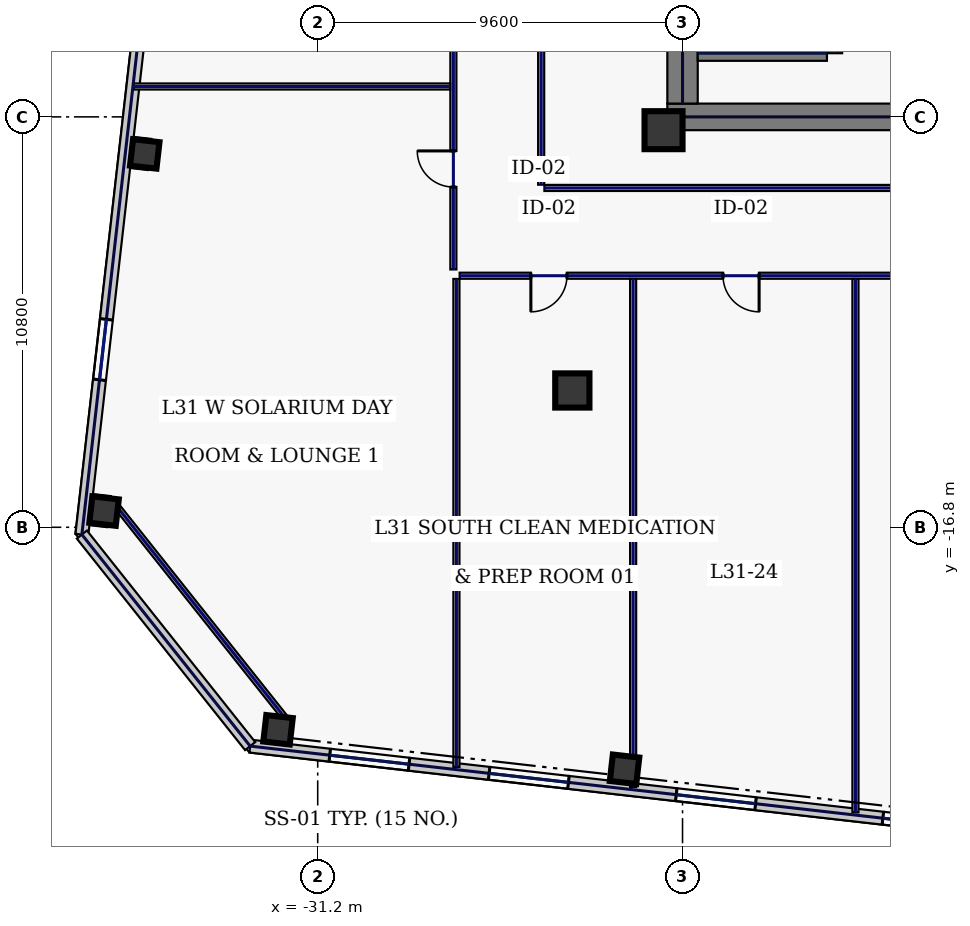
"""IFC4 building model, lengths in metres.
Left out: names, types, materials, properties, quantities, classifications, styles, units other than length and angle.
Written with IfcOpenShell. Run it as: python <this file> out.ifc"""

import sys

from ifc_helpers import new_model, si_unit, direction, frame, frame_2d, origin, origin_2d, place, context, subcontext, project, spatial, rectangle, hollow_rectangle, extrude, element, fill, save


model = new_model("IFC4")
c1 = context("Model", 3, precision=1e-05, world=origin(), true_north=direction((0.0, 1.0)))
c2 = subcontext(c1, "Body", "Model", "MODEL_VIEW")
j1 = project(units=[si_unit("LENGTHUNIT", "METRE"), si_unit("PLANEANGLEUNIT", "RADIAN")], contexts=[c1])
p1 = place(None, origin())
s1 = spatial("IfcSite", under=j1, at=p1, CompositionType="ELEMENT")
p2 = place(p1, origin())
s2 = spatial("IfcBuilding", under=s1, at=p2, CompositionType="ELEMENT")
p3 = place(p2, frame((0.0, 0.0, 137.4)))
s3 = spatial("IfcBuildingStorey", under=s2, at=p3, CompositionType="ELEMENT", Elevation=137.4)
p4 = place(p3, frame((-22.0, -6.0, 0.0), z_axis=(0.0, 0.0, 1.0), x_axis=(1.0, 0.0, 0.0)))
e1 = element("IfcWall", 1, at=p4, inside=s3, PredefinedType="SHEAR", context=c2, shape_type="SweptSolid", body=[
    extrude(rectangle(XDim=11.55, YDim=0.7, at=frame_2d((5.775, 0.0))), origin(), (0.0, 0.0, 1.0), 3.74),
])
p5 = place(p3, frame((-21.6, -5.65, 0.0), z_axis=(0.0, 0.0, 1.0), x_axis=(0.0, 1.0, 0.0)))
e2 = element("IfcWall", 2, at=p5, inside=s3, PredefinedType="SHEAR", context=c2, shape_type="SweptSolid", body=[
    extrude(rectangle(XDim=11.3, YDim=0.8, at=frame_2d((5.65, 0.0))), origin(), (0.0, 0.0, 1.0), 3.74),
])
p6 = place(p3, frame((-17.6, -4.325, 0.0), z_axis=(0.0, 0.0, 1.0), x_axis=(0.0, 1.0, 0.0)))
e3 = element("IfcWall", 3, at=p6, inside=s3, PredefinedType="SHEAR", context=c2, shape_type="SweptSolid", body=[
    extrude(rectangle(XDim=8.65, YDim=0.4, at=frame_2d((4.325, 0.0))), origin(), (0.0, 0.0, 1.0), 3.74),
])
p7 = place(p6, frame((0.25, 0.0, 0.0)))
e4 = element("IfcOpeningElement", 4, at=p7, cuts=e3, PredefinedType="OPENING", context=c2, shape_type="SweptSolid", body=[
    extrude(rectangle(XDim=1.1, YDim=2.2, at=frame_2d((0.55, 1.1))), frame((0.0, 0.21, 0.0), z_axis=(0.0, -1.0, 0.0), x_axis=(1.0, 0.0, 0.0)), (0.0, 0.0, 1.0), 0.42),
])
p8 = place(p3, frame((-21.2, -4.325, 0.0), z_axis=(0.0, 0.0, 1.0), x_axis=(1.0, 0.0, 0.0)))
e5 = element("IfcWall", 5, at=p8, inside=s3, PredefinedType="SHEAR", context=c2, shape_type="SweptSolid", body=[
    extrude(rectangle(XDim=3.4, YDim=0.4, at=frame_2d((1.7, 0.0))), origin(), (0.0, 0.0, 1.0), 3.74),
])
p9 = place(p3, frame((-22.1, -6.35, 0.0), z_axis=(0.0, 0.0, 1.0), x_axis=(1.0, 0.0, 0.0)))
e6 = element("IfcColumn", 6, at=p9, inside=s3, PredefinedType="COLUMN", context=c2, shape_type="SweptSolid", body=[
    extrude(hollow_rectangle(XDim=1.0, YDim=1.0, WallThickness=0.045, at=origin_2d()), origin(), (0.0, 0.0, 1.0), 3.74),
])
p10 = place(p3, frame((-24.5, -13.2, 0.0), z_axis=(0.0, 0.0, 1.0), x_axis=(1.0, 0.0, 0.0)))
e7 = element("IfcColumn", 7, at=p10, inside=s3, PredefinedType="COLUMN", context=c2, shape_type="SweptSolid", body=[
    extrude(hollow_rectangle(XDim=0.9, YDim=0.9, WallThickness=0.04, at=origin_2d()), origin(), (0.0, 0.0, 1.0), 3.74),
])
for number, where, z_axis, x_axis in (
    (8, (-32.244, -22.129, 0.0), (0.0, 0.0, 1.0), (0.994, -0.113, 0.0)),
    (9, (-23.126, -23.168, 0.0), (0.0, 0.0, 1.0), (0.994, -0.113, 0.0)),
    (10, (-35.751, -6.974, 0.0), (0.0, 0.0, 1.0), (0.994, -0.113, 0.0)),
    (11, (-36.822, -16.374, 0.0), (0.0, 0.0, 1.0), (0.994, -0.113, 0.0)),
):
    element("IfcColumn", number, at=place(p3, frame(where, z_axis=z_axis, x_axis=x_axis)), inside=s3, PredefinedType="COLUMN", context=c2, shape_type="SweptSolid", body=[
        extrude(hollow_rectangle(XDim=0.7, YDim=0.7, WallThickness=0.032, at=origin_2d()), origin(), (0.0, 0.0, 1.0), 3.74),
    ])
p11 = place(p3, frame((-32.977, -22.559, 0.0), z_axis=(0.0, 0.0, 1.0), x_axis=(0.993571214605, -0.113208840243, 0.0)))
e12 = element("IfcWall", 12, at=p11, inside=s3, PredefinedType="STANDARD", context=c2, shape_type="SweptSolid", body=[
    extrude(rectangle(XDim=21.223, YDim=0.34, at=frame_2d((10.611, 0.0))), origin(), (0.0, 0.0, 1.0), 3.74),
])
p12 = place(p11, frame((2.108, 0.0, 0.67)))
e13 = element("IfcOpeningElement", 13, at=p12, cuts=e12, PredefinedType="OPENING", context=c2, shape_type="SweptSolid", body=[
    extrude(rectangle(XDim=2.1, YDim=2.2, at=frame_2d((1.05, 1.1))), frame((0.0, 0.18, 0.0), z_axis=(0.0, -1.0, 0.0), x_axis=(1.0, 0.0, 0.0)), (0.0, 0.0, 1.0), 0.36),
])
p13 = place(p11, frame((6.329, 0.0, 0.67)))
e14 = element("IfcOpeningElement", 14, at=p13, cuts=e12, PredefinedType="OPENING", context=c2, shape_type="SweptSolid", body=[
    extrude(rectangle(XDim=2.1, YDim=2.2, at=frame_2d((1.05, 1.1))), frame((0.0, 0.18, 0.0), z_axis=(0.0, -1.0, 0.0), x_axis=(1.0, 0.0, 0.0)), (0.0, 0.0, 1.0), 0.36),
])
p14 = place(p11, frame((11.285, 0.0, 0.67)))
e15 = element("IfcOpeningElement", 15, at=p14, cuts=e12, PredefinedType="OPENING", context=c2, shape_type="SweptSolid", body=[
    extrude(rectangle(XDim=2.1, YDim=2.2, at=frame_2d((1.05, 1.1))), frame((0.0, 0.18, 0.0), z_axis=(0.0, -1.0, 0.0), x_axis=(1.0, 0.0, 0.0)), (0.0, 0.0, 1.0), 0.36),
])
p15 = place(p11, frame((16.756, 0.0, 0.67)))
e16 = element("IfcOpeningElement", 16, at=p15, cuts=e12, PredefinedType="OPENING", context=c2, shape_type="SweptSolid", body=[
    extrude(rectangle(XDim=0.85, YDim=1.85, at=frame_2d((0.425, 0.925))), frame((0.0, 0.18, 0.0), z_axis=(0.0, -1.0, 0.0), x_axis=(1.0, 0.0, 0.0)), (0.0, 0.0, 1.0), 0.36),
])
p16 = place(p3, frame((-32.968, 21.957, 0.0), z_axis=(0.0, 0.0, 1.0), x_axis=(-0.113201605824, -0.993572038877, 0.0)))
e17 = element("IfcWall", 17, at=p16, inside=s3, PredefinedType="STANDARD", context=c2, shape_type="SweptSolid", body=[
    extrude(rectangle(XDim=39.2, YDim=0.34, at=frame_2d((19.6, 0.0))), origin(), (0.0, 0.0, 1.0), 3.74),
])
p17 = place(p16, frame((4.1, 0.0, 0.58)))
e18 = element("IfcOpeningElement", 18, at=p17, cuts=e17, PredefinedType="OPENING", context=c2, shape_type="SweptSolid", body=[
    extrude(rectangle(XDim=1.6, YDim=2.3, at=frame_2d((0.8, 1.15))), frame((0.0, 0.18, 0.0), z_axis=(0.0, -1.0, 0.0), x_axis=(1.0, 0.0, 0.0)), (0.0, 0.0, 1.0), 0.36),
])
p18 = place(p16, frame((13.9, 0.0, 0.58)))
e19 = element("IfcOpeningElement", 19, at=p18, cuts=e17, PredefinedType="OPENING", context=c2, shape_type="SweptSolid", body=[
    extrude(rectangle(XDim=1.6, YDim=2.3, at=frame_2d((0.8, 1.15))), frame((0.0, 0.18, 0.0), z_axis=(0.0, -1.0, 0.0), x_axis=(1.0, 0.0, 0.0)), (0.0, 0.0, 1.0), 0.36),
])
p19 = place(p16, frame((23.7, 0.0, 0.58)))
e20 = element("IfcOpeningElement", 20, at=p19, cuts=e17, PredefinedType="OPENING", context=c2, shape_type="SweptSolid", body=[
    extrude(rectangle(XDim=1.6, YDim=2.3, at=frame_2d((0.8, 1.15))), frame((0.0, 0.18, 0.0), z_axis=(0.0, -1.0, 0.0), x_axis=(1.0, 0.0, 0.0)), (0.0, 0.0, 1.0), 0.36),
])
p20 = place(p16, frame((33.5, 0.0, 0.58)))
e21 = element("IfcOpeningElement", 21, at=p20, cuts=e17, PredefinedType="OPENING", context=c2, shape_type="SweptSolid", body=[
    extrude(rectangle(XDim=1.6, YDim=2.3, at=frame_2d((0.8, 1.15))), frame((0.0, 0.18, 0.0), z_axis=(0.0, -1.0, 0.0), x_axis=(1.0, 0.0, 0.0)), (0.0, 0.0, 1.0), 0.36),
])
p21 = place(p3, frame((-37.406, -16.991, 0.0), z_axis=(0.0, 0.0, 1.0), x_axis=(0.622507800567, -0.78261359446, 0.0)))
e22 = element("IfcWall", 22, at=p21, inside=s3, PredefinedType="STANDARD", context=c2, shape_type="SweptSolid", body=[
    extrude(rectangle(XDim=7.114, YDim=0.34, at=frame_2d((3.557, 0.0))), origin(), (0.0, 0.0, 1.0), 3.74),
])
p22 = place(p3, frame((-36.556, -16.162, 0.0), z_axis=(0.0, 0.0, 1.0), x_axis=(0.622522641622, -0.782601789334, 0.0)))
e23 = element("IfcWall", 23, at=p22, inside=s3, PredefinedType="PARTITIONING", context=c2, shape_type="SweptSolid", body=[
    extrude(rectangle(XDim=7.354, YDim=0.16, at=frame_2d((3.677, 0.0))), origin(), (0.0, 0.0, 1.0), 3.74),
])
p23 = place(p3, frame((-27.63, -10.015, 0.0), z_axis=(0.0, 0.0, 1.0), x_axis=(0.0, 1.0, 0.0)))
e24 = element("IfcWall", 24, at=p23, inside=s3, PredefinedType="PARTITIONING", context=c2, shape_type="SweptSolid", body=[
    extrude(rectangle(XDim=20.13, YDim=0.16, at=frame_2d((10.065, 0.0))), origin(), (0.0, 0.0, 1.0), 3.74),
])
p24 = place(p23, frame((2.169, 0.0, 0.0)))
e25 = element("IfcOpeningElement", 25, at=p24, cuts=e24, PredefinedType="OPENING", context=c2, shape_type="SweptSolid", body=[
    extrude(rectangle(XDim=0.95, YDim=2.2, at=frame_2d((0.475, 1.1))), frame((0.0, 0.09, 0.0), z_axis=(0.0, -1.0, 0.0), x_axis=(1.0, 0.0, 0.0)), (0.0, 0.0, 1.0), 0.18),
])
p25 = place(p23, frame((7.025, 0.0, 0.0)))
e26 = element("IfcOpeningElement", 26, at=p25, cuts=e24, PredefinedType="OPENING", context=c2, shape_type="SweptSolid", body=[
    extrude(rectangle(XDim=0.95, YDim=2.2, at=frame_2d((0.475, 1.1))), frame((0.0, 0.09, 0.0), z_axis=(0.0, -1.0, 0.0), x_axis=(1.0, 0.0, 0.0)), (0.0, 0.0, 1.0), 0.18),
])
p26 = place(p23, frame((12.225, 0.0, 0.0)))
e27 = element("IfcOpeningElement", 27, at=p26, cuts=e24, PredefinedType="OPENING", context=c2, shape_type="SweptSolid", body=[
    extrude(rectangle(XDim=0.95, YDim=2.2, at=frame_2d((0.475, 1.1))), frame((0.0, 0.09, 0.0), z_axis=(0.0, -1.0, 0.0), x_axis=(1.0, 0.0, 0.0)), (0.0, 0.0, 1.0), 0.18),
])
p27 = place(p23, frame((17.131, 0.0, 0.0)))
e28 = element("IfcOpeningElement", 28, at=p27, cuts=e24, PredefinedType="OPENING", context=c2, shape_type="SweptSolid", body=[
    extrude(rectangle(XDim=0.95, YDim=2.2, at=frame_2d((0.475, 1.1))), frame((0.0, 0.09, 0.0), z_axis=(0.0, -1.0, 0.0), x_axis=(1.0, 0.0, 0.0)), (0.0, 0.0, 1.0), 0.18),
])
p28 = place(p3, frame((27.465, -10.18, 0.0), z_axis=(0.0, 0.0, 1.0), x_axis=(-1.0, 0.0, 0.0)))
e29 = element("IfcWall", 29, at=p28, inside=s3, PredefinedType="PARTITIONING", context=c2, shape_type="SweptSolid", body=[
    extrude(rectangle(XDim=54.93, YDim=0.16, at=frame_2d((27.465, 0.0))), origin(), (0.0, 0.0, 1.0), 3.74),
])
p29 = place(p28, frame((52.106, 0.0, 0.0)))
e30 = element("IfcOpeningElement", 30, at=p29, cuts=e29, PredefinedType="OPENING", context=c2, shape_type="SweptSolid", body=[
    extrude(rectangle(XDim=0.95, YDim=2.2, at=frame_2d((0.475, 1.1))), frame((0.0, 0.09, 0.0), z_axis=(0.0, -1.0, 0.0), x_axis=(1.0, 0.0, 0.0)), (0.0, 0.0, 1.0), 0.18),
])
p30 = place(p28, frame((47.05, 0.0, 0.0)))
e31 = element("IfcOpeningElement", 31, at=p30, cuts=e29, PredefinedType="OPENING", context=c2, shape_type="SweptSolid", body=[
    extrude(rectangle(XDim=0.95, YDim=2.2, at=frame_2d((0.475, 1.1))), frame((0.0, 0.09, 0.0), z_axis=(0.0, -1.0, 0.0), x_axis=(1.0, 0.0, 0.0)), (0.0, 0.0, 1.0), 0.18),
])
p31 = place(p28, frame((41.65, 0.0, 0.0)))
e32 = element("IfcOpeningElement", 32, at=p31, cuts=e29, PredefinedType="OPENING", context=c2, shape_type="SweptSolid", body=[
    extrude(rectangle(XDim=0.95, YDim=2.2, at=frame_2d((0.475, 1.1))), frame((0.0, 0.09, 0.0), z_axis=(0.0, -1.0, 0.0), x_axis=(1.0, 0.0, 0.0)), (0.0, 0.0, 1.0), 0.18),
])
p32 = place(p28, frame((35.825, 0.0, 0.0)))
e33 = element("IfcOpeningElement", 33, at=p32, cuts=e29, PredefinedType="OPENING", context=c2, shape_type="SweptSolid", body=[
    extrude(rectangle(XDim=0.95, YDim=2.2, at=frame_2d((0.475, 1.1))), frame((0.0, 0.09, 0.0), z_axis=(0.0, -1.0, 0.0), x_axis=(1.0, 0.0, 0.0)), (0.0, 0.0, 1.0), 0.18),
])
p33 = place(p28, frame((29.575, 0.0, 0.0)))
e34 = element("IfcOpeningElement", 34, at=p33, cuts=e29, PredefinedType="OPENING", context=c2, shape_type="SweptSolid", body=[
    extrude(rectangle(XDim=0.95, YDim=2.2, at=frame_2d((0.475, 1.1))), frame((0.0, 0.09, 0.0), z_axis=(0.0, -1.0, 0.0), x_axis=(1.0, 0.0, 0.0)), (0.0, 0.0, 1.0), 0.18),
])
p34 = place(p28, frame((23.285, 0.0, 0.0)))
e35 = element("IfcOpeningElement", 35, at=p34, cuts=e29, PredefinedType="OPENING", context=c2, shape_type="SweptSolid", body=[
    extrude(rectangle(XDim=0.95, YDim=2.2, at=frame_2d((0.475, 1.1))), frame((0.0, 0.09, 0.0), z_axis=(0.0, -1.0, 0.0), x_axis=(1.0, 0.0, 0.0)), (0.0, 0.0, 1.0), 0.18),
])
p35 = place(p28, frame((16.78, 0.0, 0.0)))
e36 = element("IfcOpeningElement", 36, at=p35, cuts=e29, PredefinedType="OPENING", context=c2, shape_type="SweptSolid", body=[
    extrude(rectangle(XDim=1.3, YDim=2.2, at=frame_2d((0.65, 1.1))), frame((0.0, 0.09, 0.0), z_axis=(0.0, -1.0, 0.0), x_axis=(1.0, 0.0, 0.0)), (0.0, 0.0, 1.0), 0.18),
])
p36 = place(p28, frame((11.23, 0.0, 0.0)))
e37 = element("IfcOpeningElement", 37, at=p36, cuts=e29, PredefinedType="OPENING", context=c2, shape_type="SweptSolid", body=[
    extrude(rectangle(XDim=1.3, YDim=2.2, at=frame_2d((0.65, 1.1))), frame((0.0, 0.09, 0.0), z_axis=(0.0, -1.0, 0.0), x_axis=(1.0, 0.0, 0.0)), (0.0, 0.0, 1.0), 0.18),
])
p37 = place(p28, frame((6.46, 0.0, 0.0)))
e38 = element("IfcOpeningElement", 38, at=p37, cuts=e29, PredefinedType="OPENING", context=c2, shape_type="SweptSolid", body=[
    extrude(rectangle(XDim=1.3, YDim=2.2, at=frame_2d((0.65, 1.1))), frame((0.0, 0.09, 0.0), z_axis=(0.0, -1.0, 0.0), x_axis=(1.0, 0.0, 0.0)), (0.0, 0.0, 1.0), 0.18),
])
p38 = place(p28, frame((2.194, 0.0, 0.0)))
e39 = element("IfcOpeningElement", 39, at=p38, cuts=e29, PredefinedType="OPENING", context=c2, shape_type="SweptSolid", body=[
    extrude(rectangle(XDim=0.95, YDim=2.2, at=frame_2d((0.475, 1.1))), frame((0.0, 0.09, 0.0), z_axis=(0.0, -1.0, 0.0), x_axis=(1.0, 0.0, 0.0)), (0.0, 0.0, 1.0), 0.18),
])
p39 = place(p3, frame((-25.32, 7.885, 0.0), z_axis=(0.0, 0.0, 1.0), x_axis=(0.0, -1.0, 0.0)))
e40 = element("IfcWall", 40, at=p39, inside=s3, PredefinedType="PARTITIONING", context=c2, shape_type="SweptSolid", body=[
    extrude(rectangle(XDim=15.67, YDim=0.16, at=frame_2d((7.835, 0.0))), origin(), (0.0, 0.0, 1.0), 3.74),
])
p40 = place(p3, frame((-25.235, -7.87, 0.0), z_axis=(0.0, 0.0, 1.0), x_axis=(1.0, 0.0, 0.0)))
e41 = element("IfcWall", 41, at=p40, inside=s3, PredefinedType="PARTITIONING", context=c2, shape_type="SweptSolid", body=[
    extrude(rectangle(XDim=14.57, YDim=0.16, at=frame_2d((7.285, 0.0))), origin(), (0.0, 0.0, 1.0), 3.74),
])
p41 = place(p3, frame((-27.55, -23.106, 0.0), z_axis=(0.0, 0.0, 1.0), x_axis=(0.0, 1.0, 0.0)))
e42 = element("IfcWall", 42, at=p41, inside=s3, PredefinedType="PARTITIONING", context=c2, shape_type="SweptSolid", body=[
    extrude(rectangle(XDim=12.842, YDim=0.16, at=frame_2d((6.421, 0.0))), origin(), (0.0, 0.0, 1.0), 3.74),
])
p42 = place(p3, frame((-22.9, -23.636, 0.0), z_axis=(0.0, 0.0, 1.0), x_axis=(0.0, 1.0, 0.0)))
e43 = element("IfcWall", 43, at=p42, inside=s3, PredefinedType="PARTITIONING", context=c2, shape_type="SweptSolid", body=[
    extrude(rectangle(XDim=13.371, YDim=0.16, at=frame_2d((6.686, 0.0))), origin(), (0.0, 0.0, 1.0), 3.74),
])
p43 = place(p3, frame((-17.05, -24.303, 0.0), z_axis=(0.0, 0.0, 1.0), x_axis=(0.0, 1.0, 0.0)))
e44 = element("IfcWall", 44, at=p43, inside=s3, PredefinedType="PARTITIONING", context=c2, shape_type="SweptSolid", body=[
    extrude(rectangle(XDim=14.038, YDim=0.16, at=frame_2d((7.019, 0.0))), origin(), (0.0, 0.0, 1.0), 3.74),
])
p44 = place(p3, frame((-36.042, -5.2, 0.0), z_axis=(0.0, 0.0, 1.0), x_axis=(1.0, 0.0, 0.0)))
e45 = element("IfcWall", 45, at=p44, inside=s3, PredefinedType="PARTITIONING", context=c2, shape_type="SweptSolid", body=[
    extrude(rectangle(XDim=8.327, YDim=0.16, at=frame_2d((4.164, 0.0))), origin(), (0.0, 0.0, 1.0), 3.74),
])
p45 = place(p12, origin())
e46 = element("IfcWindow", 46, at=p45, inside=s3, PartitioningType="SINGLE_PANEL", PredefinedType="WINDOW", context=c2, shape_type="SweptSolid", body=[
    extrude(rectangle(XDim=2.1, YDim=2.2, at=frame_2d((1.05, 1.1))), frame((0.0, 0.03, 0.0), z_axis=(0.0, -1.0, 0.0), x_axis=(1.0, 0.0, 0.0)), (0.0, 0.0, 1.0), 0.06),
])
fill(e13, e46)
p46 = place(p13, origin())
e47 = element("IfcWindow", 47, at=p46, inside=s3, PartitioningType="SINGLE_PANEL", PredefinedType="WINDOW", context=c2, shape_type="SweptSolid", body=[
    extrude(rectangle(XDim=2.1, YDim=2.2, at=frame_2d((1.05, 1.1))), frame((0.0, 0.03, 0.0), z_axis=(0.0, -1.0, 0.0), x_axis=(1.0, 0.0, 0.0)), (0.0, 0.0, 1.0), 0.06),
])
fill(e14, e47)
p47 = place(p14, origin())
e48 = element("IfcWindow", 48, at=p47, inside=s3, PartitioningType="SINGLE_PANEL", PredefinedType="WINDOW", context=c2, shape_type="SweptSolid", body=[
    extrude(rectangle(XDim=2.1, YDim=2.2, at=frame_2d((1.05, 1.1))), frame((0.0, 0.03, 0.0), z_axis=(0.0, -1.0, 0.0), x_axis=(1.0, 0.0, 0.0)), (0.0, 0.0, 1.0), 0.06),
])
fill(e15, e48)
p48 = place(p15, origin())
e49 = element("IfcWindow", 49, at=p48, inside=s3, PartitioningType="SINGLE_PANEL", PredefinedType="WINDOW", context=c2, shape_type="SweptSolid", body=[
    extrude(rectangle(XDim=0.85, YDim=1.85, at=frame_2d((0.425, 0.925))), frame((0.0, 0.03, 0.0), z_axis=(0.0, -1.0, 0.0), x_axis=(1.0, 0.0, 0.0)), (0.0, 0.0, 1.0), 0.06),
])
fill(e16, e49)
p49 = place(p20, origin())
e50 = element("IfcWindow", 50, at=p49, inside=s3, PartitioningType="SINGLE_PANEL", PredefinedType="WINDOW", context=c2, shape_type="SweptSolid", body=[
    extrude(rectangle(XDim=1.6, YDim=2.3, at=frame_2d((0.8, 1.15))), frame((0.0, 0.03, 0.0), z_axis=(0.0, -1.0, 0.0), x_axis=(1.0, 0.0, 0.0)), (0.0, 0.0, 1.0), 0.06),
])
fill(e21, e50)
p50 = place(p29, origin())
e51 = element("IfcDoor", 51, at=p50, inside=s3, OperationType="SINGLE_SWING_RIGHT", PredefinedType="DOOR", context=c2, shape_type="SweptSolid", body=[
    extrude(rectangle(XDim=0.95, YDim=2.2, at=frame_2d((0.475, 1.1))), frame((0.0, 0.025, 0.0), z_axis=(0.0, -1.0, 0.0), x_axis=(1.0, 0.0, 0.0)), (0.0, 0.0, 1.0), 0.05),
])
fill(e30, e51)
p51 = place(p30, origin())
e52 = element("IfcDoor", 52, at=p51, inside=s3, OperationType="SINGLE_SWING_LEFT", PredefinedType="DOOR", context=c2, shape_type="SweptSolid", body=[
    extrude(rectangle(XDim=0.95, YDim=2.2, at=frame_2d((0.475, 1.1))), frame((0.0, 0.025, 0.0), z_axis=(0.0, -1.0, 0.0), x_axis=(1.0, 0.0, 0.0)), (0.0, 0.0, 1.0), 0.05),
])
fill(e31, e52)
p52 = place(p24, origin())
e53 = element("IfcDoor", 53, at=p52, inside=s3, OperationType="SINGLE_SWING_RIGHT", PredefinedType="DOOR", context=c2, shape_type="SweptSolid", body=[
    extrude(rectangle(XDim=0.95, YDim=2.2, at=frame_2d((0.475, 1.1))), frame((0.0, 0.025, 0.0), z_axis=(0.0, -1.0, 0.0), x_axis=(1.0, 0.0, 0.0)), (0.0, 0.0, 1.0), 0.05),
])
fill(e25, e53)
save(model, sys.argv[1])
